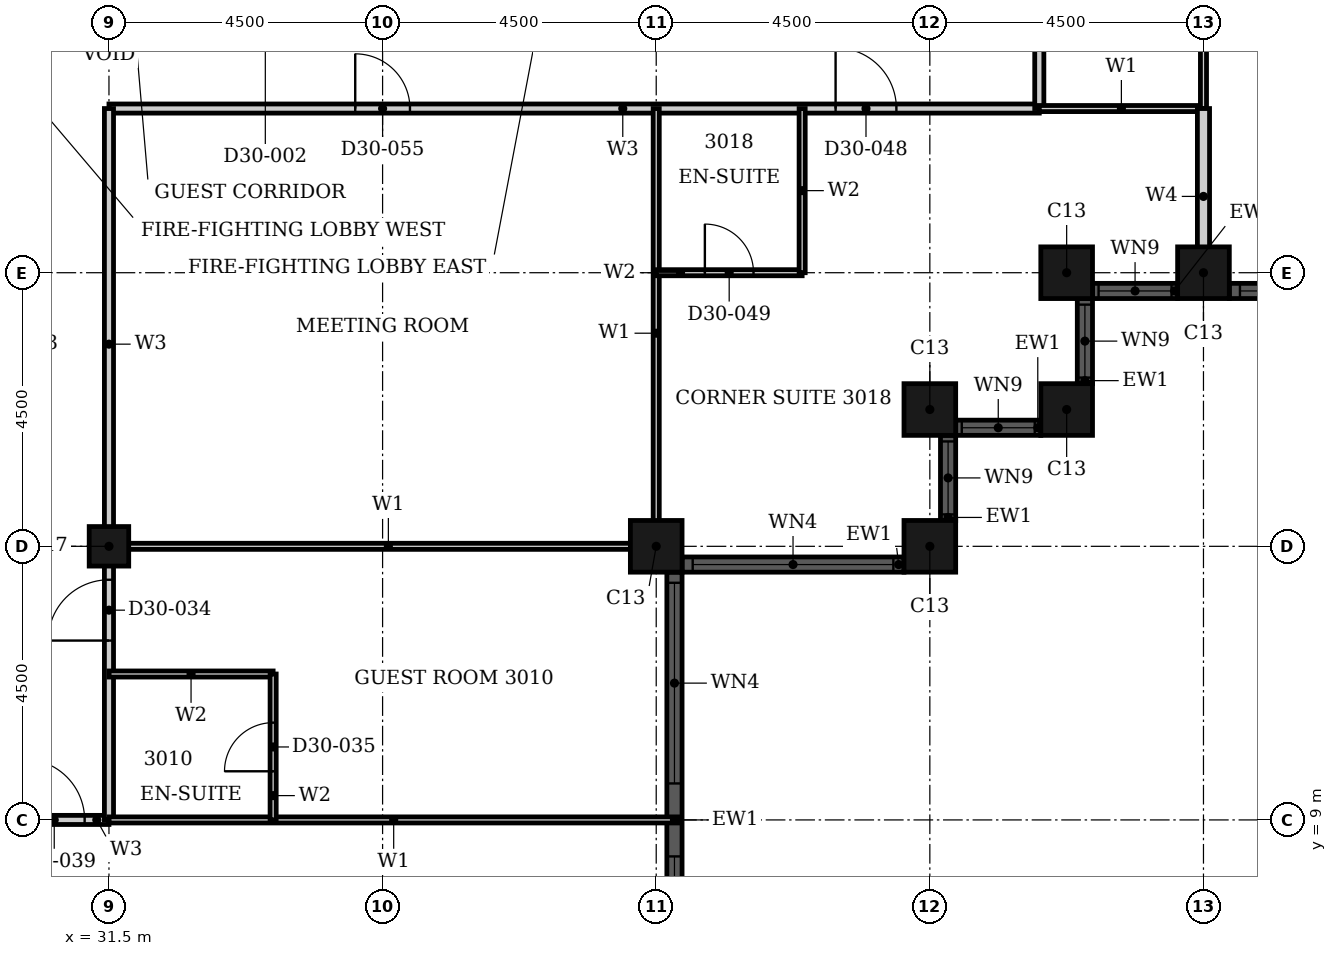
"""IFC4 building model, lengths in metres.
Left out: names, types, materials, properties, quantities, classifications, styles, units other than length and angle.
Written with IfcOpenShell. Run it as: python <this file> out.ifc"""

import sys

from ifc_helpers import new_model, si_unit, direction, frame, frame_2d, origin, origin_2d, place, context, subcontext, project, spatial, rectangle, hollow_rectangle, extrude, element, fill, save


model = new_model("IFC4")
c1 = context("Model", 3, precision=1e-05, world=origin(), true_north=direction((0.0, 1.0)))
c2 = subcontext(c1, "Body", "Model", "MODEL_VIEW")
j1 = project(units=[si_unit("LENGTHUNIT", "METRE"), si_unit("PLANEANGLEUNIT", "RADIAN")], contexts=[c1])
p1 = place(None, origin())
s1 = spatial("IfcSite", under=j1, at=p1, CompositionType="ELEMENT")
p2 = place(p1, origin())
s2 = spatial("IfcBuilding", under=s1, at=p2, CompositionType="ELEMENT")
p3 = place(p2, frame((0.0, 0.0, 122.4)))
s3 = spatial("IfcBuildingStorey", under=s2, at=p3, CompositionType="ELEMENT", Elevation=122.4)
for number, where, z_axis, x_axis in (
    (1, (40.5, 13.5, 0.0), (0.0, 0.0, 1.0), (1.0, 0.0, 0.0)),
    (2, (45.0, 13.5, 0.0), (0.0, 0.0, 1.0), (1.0, 0.0, 0.0)),
    (3, (45.0, 15.75, 0.0), (0.0, 0.0, 1.0), (1.0, 0.0, 0.0)),
    (4, (47.25, 15.75, 0.0), (0.0, 0.0, 1.0), (1.0, 0.0, 0.0)),
    (5, (47.25, 18.0, 0.0), (0.0, 0.0, 1.0), (1.0, 0.0, 0.0)),
    (6, (49.5, 18.0, 0.0), (0.0, 0.0, 1.0), (1.0, 0.0, 0.0)),
):
    element("IfcColumn", number, at=place(p3, frame(where, z_axis=z_axis, x_axis=x_axis)), inside=s3, PredefinedType="COLUMN", context=c2, shape_type="SweptSolid", body=[
        extrude(hollow_rectangle(XDim=0.85, YDim=0.85, WallThickness=0.026, at=origin_2d()), origin(), (0.0, 0.0, 1.0), 3.6),
    ])
p4 = place(p3, frame((31.5, 13.5, 0.0), z_axis=(0.0, 0.0, 1.0), x_axis=(1.0, 0.0, 0.0)))
e7 = element("IfcColumn", 7, at=p4, inside=s3, PredefinedType="COLUMN", context=c2, shape_type="SweptSolid", body=[
    extrude(hollow_rectangle(XDim=0.65, YDim=0.65, WallThickness=0.021, at=origin_2d()), origin(), (0.0, 0.0, 1.0), 3.6),
])
p5 = place(p3, frame((40.8, 4.925, 0.0), z_axis=(0.0, 0.0, 1.0), x_axis=(0.0, 1.0, 0.0)))
e8 = element("IfcWall", 8, at=p5, inside=s3, PredefinedType="SOLIDWALL", context=c2, shape_type="SweptSolid", body=[
    extrude(rectangle(XDim=8.15, YDim=0.25, at=frame_2d((4.075, 0.0))), origin(), (0.0, 0.0, 1.0), 3.6),
])
p6 = place(p5, frame((0.175, 0.0, 0.9)))
e9 = element("IfcOpeningElement", 9, at=p6, cuts=e8, PredefinedType="OPENING", context=c2, shape_type="SweptSolid", body=[
    extrude(rectangle(XDim=3.3, YDim=2.08, at=frame_2d((1.65, 1.04))), frame((0.0, 0.135, 0.0), z_axis=(0.0, -1.0, 0.0), x_axis=(1.0, 0.0, 0.0)), (0.0, 0.0, 1.0), 0.27),
])
p7 = place(p5, frame((4.675, 0.0, 0.9)))
e10 = element("IfcOpeningElement", 10, at=p7, cuts=e8, PredefinedType="OPENING", context=c2, shape_type="SweptSolid", body=[
    extrude(rectangle(XDim=3.3, YDim=2.08, at=frame_2d((1.65, 1.04))), frame((0.0, 0.135, 0.0), z_axis=(0.0, -1.0, 0.0), x_axis=(1.0, 0.0, 0.0)), (0.0, 0.0, 1.0), 0.27),
])
p8 = place(p3, frame((40.925, 13.2, 0.0), z_axis=(0.0, 0.0, 1.0), x_axis=(1.0, 0.0, 0.0)))
e11 = element("IfcWall", 11, at=p8, inside=s3, PredefinedType="SOLIDWALL", context=c2, shape_type="SweptSolid", body=[
    extrude(rectangle(XDim=3.65, YDim=0.25, at=frame_2d((1.825, 0.0))), origin(), (0.0, 0.0, 1.0), 3.6),
])
p9 = place(p8, frame((0.175, 0.0, 0.9)))
e12 = element("IfcOpeningElement", 12, at=p9, cuts=e11, PredefinedType="OPENING", context=c2, shape_type="SweptSolid", body=[
    extrude(rectangle(XDim=3.3, YDim=2.08, at=frame_2d((1.65, 1.04))), frame((0.0, 0.135, 0.0), z_axis=(0.0, -1.0, 0.0), x_axis=(1.0, 0.0, 0.0)), (0.0, 0.0, 1.0), 0.27),
])
p10 = place(p3, frame((45.3, 13.925, 0.0), z_axis=(0.0, 0.0, 1.0), x_axis=(0.0, 1.0, 0.0)))
e13 = element("IfcWall", 13, at=p10, inside=s3, PredefinedType="SOLIDWALL", context=c2, shape_type="SweptSolid", body=[
    extrude(rectangle(XDim=1.4, YDim=0.25, at=frame_2d((0.7, 0.0))), origin(), (0.0, 0.0, 1.0), 3.6),
])
p11 = place(p10, frame((0.1, 0.0, 0.9)))
e14 = element("IfcOpeningElement", 14, at=p11, cuts=e13, PredefinedType="OPENING", context=c2, shape_type="SweptSolid", body=[
    extrude(rectangle(XDim=1.2, YDim=2.08, at=frame_2d((0.6, 1.04))), frame((0.0, 0.135, 0.0), z_axis=(0.0, -1.0, 0.0), x_axis=(1.0, 0.0, 0.0)), (0.0, 0.0, 1.0), 0.27),
])
p12 = place(p3, frame((45.425, 15.45, 0.0), z_axis=(0.0, 0.0, 1.0), x_axis=(1.0, 0.0, 0.0)))
e15 = element("IfcWall", 15, at=p12, inside=s3, PredefinedType="SOLIDWALL", context=c2, shape_type="SweptSolid", body=[
    extrude(rectangle(XDim=1.4, YDim=0.25, at=frame_2d((0.7, 0.0))), origin(), (0.0, 0.0, 1.0), 3.6),
])
p13 = place(p12, frame((0.1, 0.0, 0.9)))
e16 = element("IfcOpeningElement", 16, at=p13, cuts=e15, PredefinedType="OPENING", context=c2, shape_type="SweptSolid", body=[
    extrude(rectangle(XDim=1.2, YDim=2.08, at=frame_2d((0.6, 1.04))), frame((0.0, 0.135, 0.0), z_axis=(0.0, -1.0, 0.0), x_axis=(1.0, 0.0, 0.0)), (0.0, 0.0, 1.0), 0.27),
])
p14 = place(p3, frame((47.55, 16.175, 0.0), z_axis=(0.0, 0.0, 1.0), x_axis=(0.0, 1.0, 0.0)))
e17 = element("IfcWall", 17, at=p14, inside=s3, PredefinedType="SOLIDWALL", context=c2, shape_type="SweptSolid", body=[
    extrude(rectangle(XDim=1.4, YDim=0.25, at=frame_2d((0.7, 0.0))), origin(), (0.0, 0.0, 1.0), 3.6),
])
p15 = place(p14, frame((0.1, 0.0, 0.9)))
e18 = element("IfcOpeningElement", 18, at=p15, cuts=e17, PredefinedType="OPENING", context=c2, shape_type="SweptSolid", body=[
    extrude(rectangle(XDim=1.2, YDim=2.08, at=frame_2d((0.6, 1.04))), frame((0.0, 0.135, 0.0), z_axis=(0.0, -1.0, 0.0), x_axis=(1.0, 0.0, 0.0)), (0.0, 0.0, 1.0), 0.27),
])
p16 = place(p3, frame((47.675, 17.7, 0.0), z_axis=(0.0, 0.0, 1.0), x_axis=(1.0, 0.0, 0.0)))
e19 = element("IfcWall", 19, at=p16, inside=s3, PredefinedType="SOLIDWALL", context=c2, shape_type="SweptSolid", body=[
    extrude(rectangle(XDim=1.4, YDim=0.25, at=frame_2d((0.7, 0.0))), origin(), (0.0, 0.0, 1.0), 3.6),
])
p17 = place(p16, frame((0.1, 0.0, 0.9)))
e20 = element("IfcOpeningElement", 20, at=p17, cuts=e19, PredefinedType="OPENING", context=c2, shape_type="SweptSolid", body=[
    extrude(rectangle(XDim=1.2, YDim=2.08, at=frame_2d((0.6, 1.04))), frame((0.0, 0.135, 0.0), z_axis=(0.0, -1.0, 0.0), x_axis=(1.0, 0.0, 0.0)), (0.0, 0.0, 1.0), 0.27),
])
p18 = place(p3, frame((49.925, 17.7, 0.0), z_axis=(0.0, 0.0, 1.0), x_axis=(1.0, 0.0, 0.0)))
e21 = element("IfcWall", 21, at=p18, inside=s3, PredefinedType="SOLIDWALL", context=c2, shape_type="SweptSolid", body=[
    extrude(rectangle(XDim=8.15, YDim=0.25, at=frame_2d((4.075, 0.0))), origin(), (0.0, 0.0, 1.0), 3.6),
])
p19 = place(p18, frame((0.175, 0.0, 0.9)))
e22 = element("IfcOpeningElement", 22, at=p19, cuts=e21, PredefinedType="OPENING", context=c2, shape_type="SweptSolid", body=[
    extrude(rectangle(XDim=3.3, YDim=2.08, at=frame_2d((1.65, 1.04))), frame((0.0, 0.135, 0.0), z_axis=(0.0, -1.0, 0.0), x_axis=(1.0, 0.0, 0.0)), (0.0, 0.0, 1.0), 0.27),
])
p20 = place(p18, frame((4.675, 0.0, 0.9)))
e23 = element("IfcOpeningElement", 23, at=p20, cuts=e21, PredefinedType="OPENING", context=c2, shape_type="SweptSolid", body=[
    extrude(rectangle(XDim=3.3, YDim=2.08, at=frame_2d((1.65, 1.04))), frame((0.0, 0.135, 0.0), z_axis=(0.0, -1.0, 0.0), x_axis=(1.0, 0.0, 0.0)), (0.0, 0.0, 1.0), 0.27),
])
p21 = place(p3, frame((31.5, 20.7, 0.0), z_axis=(0.0, 0.0, 1.0), x_axis=(1.0, 0.0, 0.0)))
e24 = element("IfcWall", 24, at=p21, inside=s3, PredefinedType="PARTITIONING", context=c2, shape_type="SweptSolid", body=[
    extrude(rectangle(XDim=15.3, YDim=0.15, at=frame_2d((7.65, 0.0))), origin(), (0.0, 0.0, 1.0), 3.3),
])
p22 = place(p21, frame((11.95, 0.0, 0.0)))
e25 = element("IfcOpeningElement", 25, at=p22, cuts=e24, PredefinedType="OPENING", context=c2, shape_type="SweptSolid", body=[
    extrude(rectangle(XDim=1.0, YDim=2.1, at=frame_2d((0.5, 1.05))), frame((0.0, 0.085, 0.0), z_axis=(0.0, -1.0, 0.0), x_axis=(1.0, 0.0, 0.0)), (0.0, 0.0, 1.0), 0.17),
])
p23 = place(p21, frame((4.05, 0.0, 0.0)))
e26 = element("IfcOpeningElement", 26, at=p23, cuts=e24, PredefinedType="OPENING", context=c2, shape_type="SweptSolid", body=[
    extrude(rectangle(XDim=0.9, YDim=2.1, at=frame_2d((0.45, 1.05))), frame((0.0, 0.085, 0.0), z_axis=(0.0, -1.0, 0.0), x_axis=(1.0, 0.0, 0.0)), (0.0, 0.0, 1.0), 0.17),
])
p24 = place(p3, frame((29.7, 9.0, 0.0), z_axis=(0.0, 0.0, 1.0), x_axis=(1.0, 0.0, 0.0)))
e27 = element("IfcWall", 27, at=p24, inside=s3, PredefinedType="PARTITIONING", context=c2, shape_type="SweptSolid", body=[
    extrude(rectangle(XDim=1.8, YDim=0.15, at=frame_2d((0.9, 0.0))), origin(), (0.0, 0.0, 1.0), 3.3),
])
p25 = place(p24, frame((0.4, 0.0, 0.0)))
e28 = element("IfcOpeningElement", 28, at=p25, cuts=e27, PredefinedType="OPENING", context=c2, shape_type="SweptSolid", body=[
    extrude(rectangle(XDim=1.0, YDim=2.1, at=frame_2d((0.5, 1.05))), frame((0.0, 0.085, 0.0), z_axis=(0.0, -1.0, 0.0), x_axis=(1.0, 0.0, 0.0)), (0.0, 0.0, 1.0), 0.17),
])
p26 = place(p3, frame((31.5, 9.0, 0.0), z_axis=(0.0, 0.0, 1.0), x_axis=(0.0, 1.0, 0.0)))
e29 = element("IfcWall", 29, at=p26, inside=s3, PredefinedType="PARTITIONING", context=c2, shape_type="SweptSolid", body=[
    extrude(rectangle(XDim=11.7, YDim=0.15, at=frame_2d((5.85, 0.0))), origin(), (0.0, 0.0, 1.0), 2.58),
])
p27 = place(p26, frame((2.95, 0.0, 0.0)))
e30 = element("IfcOpeningElement", 30, at=p27, cuts=e29, PredefinedType="OPENING", context=c2, shape_type="SweptSolid", body=[
    extrude(rectangle(XDim=1.0, YDim=2.1, at=frame_2d((0.5, 1.05))), frame((0.0, 0.085, 0.0), z_axis=(0.0, -1.0, 0.0), x_axis=(1.0, 0.0, 0.0)), (0.0, 0.0, 1.0), 0.17),
])
p28 = place(p3, frame((46.8, 20.7, 0.0), z_axis=(0.0, 0.0, 1.0), x_axis=(0.0, 1.0, 0.0)))
e31 = element("IfcWall", 31, at=p28, inside=s3, PredefinedType="PARTITIONING", context=c2, shape_type="SweptSolid", body=[
    extrude(rectangle(XDim=6.3, YDim=0.15, at=frame_2d((3.15, 0.0))), origin(), (0.0, 0.0, 1.0), 3.3),
])
p29 = place(p28, frame((2.65, 0.0, 0.0)))
e32 = element("IfcOpeningElement", 32, at=p29, cuts=e31, PredefinedType="OPENING", context=c2, shape_type="SweptSolid", body=[
    extrude(rectangle(XDim=0.9, YDim=2.1, at=frame_2d((0.45, 1.05))), frame((0.0, 0.085, 0.0), z_axis=(0.0, -1.0, 0.0), x_axis=(1.0, 0.0, 0.0)), (0.0, 0.0, 1.0), 0.17),
])
p30 = place(p3, frame((31.5, 13.5, 0.0), z_axis=(0.0, 0.0, 1.0), x_axis=(1.0, 0.0, 0.0)))
e33 = element("IfcWall", 33, at=p30, inside=s3, PredefinedType="PARTITIONING", context=c2, shape_type="SweptSolid", body=[
    extrude(rectangle(XDim=9.19, YDim=0.1, at=frame_2d((4.595, 0.0))), origin(), (0.0, 0.0, 1.0), 2.38),
])
p31 = place(p3, frame((46.8, 20.7, 0.0), z_axis=(0.0, 0.0, 1.0), x_axis=(1.0, 0.0, 0.0)))
e34 = element("IfcWall", 34, at=p31, inside=s3, PredefinedType="PARTITIONING", context=c2, shape_type="SweptSolid", body=[
    extrude(rectangle(XDim=2.7, YDim=0.1, at=frame_2d((1.35, 0.0))), origin(), (0.0, 0.0, 1.0), 3.3),
])
p32 = place(p3, frame((31.5, 9.0, 0.0), z_axis=(0.0, 0.0, 1.0), x_axis=(1.0, 0.0, 0.0)))
e35 = element("IfcWall", 35, at=p32, inside=s3, PredefinedType="PARTITIONING", context=c2, shape_type="SweptSolid", body=[
    extrude(rectangle(XDim=9.365, YDim=0.1, at=frame_2d((4.683, 0.0))), origin(), (0.0, 0.0, 1.0), 3.3),
])
p33 = place(p3, frame((40.5, 13.31, 0.0), z_axis=(0.0, 0.0, 1.0), x_axis=(0.0, 1.0, 0.0)))
e36 = element("IfcWall", 36, at=p33, inside=s3, PredefinedType="PARTITIONING", context=c2, shape_type="SweptSolid", body=[
    extrude(rectangle(XDim=7.39, YDim=0.1, at=frame_2d((3.695, 0.0))), origin(), (0.0, 0.0, 1.0), 3.3),
])
p34 = place(p3, frame((49.5, 20.7, 0.0), z_axis=(0.0, 0.0, 1.0), x_axis=(0.0, 1.0, 0.0)))
e37 = element("IfcWall", 37, at=p34, inside=s3, PredefinedType="PARTITIONING", context=c2, shape_type="SweptSolid", body=[
    extrude(rectangle(XDim=6.3, YDim=0.1, at=frame_2d((3.15, 0.0))), origin(), (0.0, 0.0, 1.0), 2.38),
])
p35 = place(p3, frame((49.5, 17.81, 0.0), z_axis=(0.0, 0.0, 1.0), x_axis=(0.0, 1.0, 0.0)))
e38 = element("IfcWall", 38, at=p35, inside=s3, PredefinedType="PARTITIONING", context=c2, shape_type="SweptSolid", body=[
    extrude(rectangle(XDim=2.89, YDim=0.2, at=frame_2d((1.445, 0.0))), origin(), (0.0, 0.0, 1.0), 2.38),
])
p36 = place(p3, frame((31.5, 11.4, 0.0), z_axis=(0.0, 0.0, 1.0), x_axis=(1.0, 0.0, 0.0)))
e39 = element("IfcWall", 39, at=p36, inside=s3, PredefinedType="PARTITIONING", context=c2, shape_type="SweptSolid", body=[
    extrude(rectangle(XDim=2.7, YDim=0.1, at=frame_2d((1.35, 0.0))), origin(), (0.0, 0.0, 1.0), 3.3),
])
p37 = place(p3, frame((40.5, 18.0, 0.0), z_axis=(0.0, 0.0, 1.0), x_axis=(1.0, 0.0, 0.0)))
e40 = element("IfcWall", 40, at=p37, inside=s3, PredefinedType="PARTITIONING", context=c2, shape_type="SweptSolid", body=[
    extrude(rectangle(XDim=2.4, YDim=0.1, at=frame_2d((1.2, 0.0))), origin(), (0.0, 0.0, 1.0), 3.3),
])
p38 = place(p37, frame((0.8, 0.0, 0.0)))
e41 = element("IfcOpeningElement", 41, at=p38, cuts=e40, PredefinedType="OPENING", context=c2, shape_type="SweptSolid", body=[
    extrude(rectangle(XDim=0.8, YDim=2.1, at=frame_2d((0.4, 1.05))), frame((0.0, 0.06, 0.0), z_axis=(0.0, -1.0, 0.0), x_axis=(1.0, 0.0, 0.0)), (0.0, 0.0, 1.0), 0.12),
])
p39 = place(p3, frame((34.2, 9.0, 0.0), z_axis=(0.0, 0.0, 1.0), x_axis=(0.0, 1.0, 0.0)))
e42 = element("IfcWall", 42, at=p39, inside=s3, PredefinedType="PARTITIONING", context=c2, shape_type="SweptSolid", body=[
    extrude(rectangle(XDim=2.4, YDim=0.1, at=frame_2d((1.2, 0.0))), origin(), (0.0, 0.0, 1.0), 3.3),
])
p40 = place(p39, frame((0.8, 0.0, 0.0)))
e43 = element("IfcOpeningElement", 43, at=p40, cuts=e42, PredefinedType="OPENING", context=c2, shape_type="SweptSolid", body=[
    extrude(rectangle(XDim=0.8, YDim=2.1, at=frame_2d((0.4, 1.05))), frame((0.0, 0.06, 0.0), z_axis=(0.0, -1.0, 0.0), x_axis=(1.0, 0.0, 0.0)), (0.0, 0.0, 1.0), 0.12),
])
p41 = place(p3, frame((42.9, 18.0, 0.0), z_axis=(0.0, 0.0, 1.0), x_axis=(0.0, 1.0, 0.0)))
e44 = element("IfcWall", 44, at=p41, inside=s3, PredefinedType="PARTITIONING", context=c2, shape_type="SweptSolid", body=[
    extrude(rectangle(XDim=2.7, YDim=0.1, at=frame_2d((1.35, 0.0))), origin(), (0.0, 0.0, 1.0), 3.3),
])
p42 = place(p6, origin())
e45 = element("IfcWindow", 45, at=p42, inside=s3, PartitioningType="SINGLE_PANEL", PredefinedType="WINDOW", context=c2, shape_type="SweptSolid", body=[
    extrude(rectangle(XDim=3.3, YDim=2.08, at=frame_2d((1.65, 1.04))), frame((0.0, 0.03, 0.0), z_axis=(0.0, -1.0, 0.0), x_axis=(1.0, 0.0, 0.0)), (0.0, 0.0, 1.0), 0.06),
])
fill(e9, e45)
p43 = place(p7, origin())
e46 = element("IfcWindow", 46, at=p43, inside=s3, PartitioningType="SINGLE_PANEL", PredefinedType="WINDOW", context=c2, shape_type="SweptSolid", body=[
    extrude(rectangle(XDim=3.3, YDim=2.08, at=frame_2d((1.65, 1.04))), frame((0.0, 0.03, 0.0), z_axis=(0.0, -1.0, 0.0), x_axis=(1.0, 0.0, 0.0)), (0.0, 0.0, 1.0), 0.06),
])
fill(e10, e46)
p44 = place(p9, origin())
e47 = element("IfcWindow", 47, at=p44, inside=s3, PartitioningType="SINGLE_PANEL", PredefinedType="WINDOW", context=c2, shape_type="SweptSolid", body=[
    extrude(rectangle(XDim=3.3, YDim=2.08, at=frame_2d((1.65, 1.04))), frame((0.0, 0.03, 0.0), z_axis=(0.0, -1.0, 0.0), x_axis=(1.0, 0.0, 0.0)), (0.0, 0.0, 1.0), 0.06),
])
fill(e12, e47)
p45 = place(p11, origin())
e48 = element("IfcWindow", 48, at=p45, inside=s3, PartitioningType="SINGLE_PANEL", PredefinedType="WINDOW", context=c2, shape_type="SweptSolid", body=[
    extrude(rectangle(XDim=1.2, YDim=2.08, at=frame_2d((0.6, 1.04))), frame((0.0, 0.03, 0.0), z_axis=(0.0, -1.0, 0.0), x_axis=(1.0, 0.0, 0.0)), (0.0, 0.0, 1.0), 0.06),
])
fill(e14, e48)
p46 = place(p13, origin())
e49 = element("IfcWindow", 49, at=p46, inside=s3, PartitioningType="SINGLE_PANEL", PredefinedType="WINDOW", context=c2, shape_type="SweptSolid", body=[
    extrude(rectangle(XDim=1.2, YDim=2.08, at=frame_2d((0.6, 1.04))), frame((0.0, 0.03, 0.0), z_axis=(0.0, -1.0, 0.0), x_axis=(1.0, 0.0, 0.0)), (0.0, 0.0, 1.0), 0.06),
])
fill(e16, e49)
p47 = place(p15, origin())
e50 = element("IfcWindow", 50, at=p47, inside=s3, PartitioningType="SINGLE_PANEL", PredefinedType="WINDOW", context=c2, shape_type="SweptSolid", body=[
    extrude(rectangle(XDim=1.2, YDim=2.08, at=frame_2d((0.6, 1.04))), frame((0.0, 0.03, 0.0), z_axis=(0.0, -1.0, 0.0), x_axis=(1.0, 0.0, 0.0)), (0.0, 0.0, 1.0), 0.06),
])
fill(e18, e50)
p48 = place(p17, origin())
e51 = element("IfcWindow", 51, at=p48, inside=s3, PartitioningType="SINGLE_PANEL", PredefinedType="WINDOW", context=c2, shape_type="SweptSolid", body=[
    extrude(rectangle(XDim=1.2, YDim=2.08, at=frame_2d((0.6, 1.04))), frame((0.0, 0.03, 0.0), z_axis=(0.0, -1.0, 0.0), x_axis=(1.0, 0.0, 0.0)), (0.0, 0.0, 1.0), 0.06),
])
fill(e20, e51)
p49 = place(p19, origin())
e52 = element("IfcWindow", 52, at=p49, inside=s3, PartitioningType="SINGLE_PANEL", PredefinedType="WINDOW", context=c2, shape_type="SweptSolid", body=[
    extrude(rectangle(XDim=3.3, YDim=2.08, at=frame_2d((1.65, 1.04))), frame((0.0, 0.03, 0.0), z_axis=(0.0, -1.0, 0.0), x_axis=(1.0, 0.0, 0.0)), (0.0, 0.0, 1.0), 0.06),
])
fill(e22, e52)
p50 = place(p27, origin())
e53 = element("IfcDoor", 53, at=p50, inside=s3, OperationType="SINGLE_SWING_RIGHT", PredefinedType="DOOR", context=c2, shape_type="SweptSolid", body=[
    extrude(rectangle(XDim=1.0, YDim=2.1, at=frame_2d((0.5, 1.05))), frame((0.0, 0.025, 0.0), z_axis=(0.0, -1.0, 0.0), x_axis=(1.0, 0.0, 0.0)), (0.0, 0.0, 1.0), 0.05),
])
fill(e30, e53)
p51 = place(p40, origin())
e54 = element("IfcDoor", 54, at=p51, inside=s3, OperationType="SINGLE_SWING_LEFT", PredefinedType="DOOR", context=c2, shape_type="SweptSolid", body=[
    extrude(rectangle(XDim=0.8, YDim=2.1, at=frame_2d((0.4, 1.05))), frame((0.0, 0.025, 0.0), z_axis=(0.0, -1.0, 0.0), x_axis=(1.0, 0.0, 0.0)), (0.0, 0.0, 1.0), 0.05),
])
fill(e43, e54)
p52 = place(p25, origin())
e55 = element("IfcDoor", 55, at=p52, inside=s3, OperationType="SINGLE_SWING_RIGHT", PredefinedType="DOOR", context=c2, shape_type="SweptSolid", body=[
    extrude(rectangle(XDim=1.0, YDim=2.1, at=frame_2d((0.5, 1.05))), frame((0.0, 0.025, 0.0), z_axis=(0.0, -1.0, 0.0), x_axis=(1.0, 0.0, 0.0)), (0.0, 0.0, 1.0), 0.05),
])
fill(e28, e55)
p53 = place(p22, origin())
e56 = element("IfcDoor", 56, at=p53, inside=s3, OperationType="SINGLE_SWING_RIGHT", PredefinedType="DOOR", context=c2, shape_type="SweptSolid", body=[
    extrude(rectangle(XDim=1.0, YDim=2.1, at=frame_2d((0.5, 1.05))), frame((0.0, 0.025, 0.0), z_axis=(0.0, -1.0, 0.0), x_axis=(1.0, 0.0, 0.0)), (0.0, 0.0, 1.0), 0.05),
])
fill(e25, e56)
p54 = place(p38, origin())
e57 = element("IfcDoor", 57, at=p54, inside=s3, OperationType="SINGLE_SWING_LEFT", PredefinedType="DOOR", context=c2, shape_type="SweptSolid", body=[
    extrude(rectangle(XDim=0.8, YDim=2.1, at=frame_2d((0.4, 1.05))), frame((0.0, 0.025, 0.0), z_axis=(0.0, -1.0, 0.0), x_axis=(1.0, 0.0, 0.0)), (0.0, 0.0, 1.0), 0.05),
])
fill(e41, e57)
p55 = place(p23, origin())
e58 = element("IfcDoor", 58, at=p55, inside=s3, OperationType="SINGLE_SWING_LEFT", PredefinedType="DOOR", context=c2, shape_type="SweptSolid", body=[
    extrude(rectangle(XDim=0.9, YDim=2.1, at=frame_2d((0.45, 1.05))), frame((0.0, 0.025, 0.0), z_axis=(0.0, -1.0, 0.0), x_axis=(1.0, 0.0, 0.0)), (0.0, 0.0, 1.0), 0.05),
])
fill(e26, e58)
save(model, sys.argv[1])
